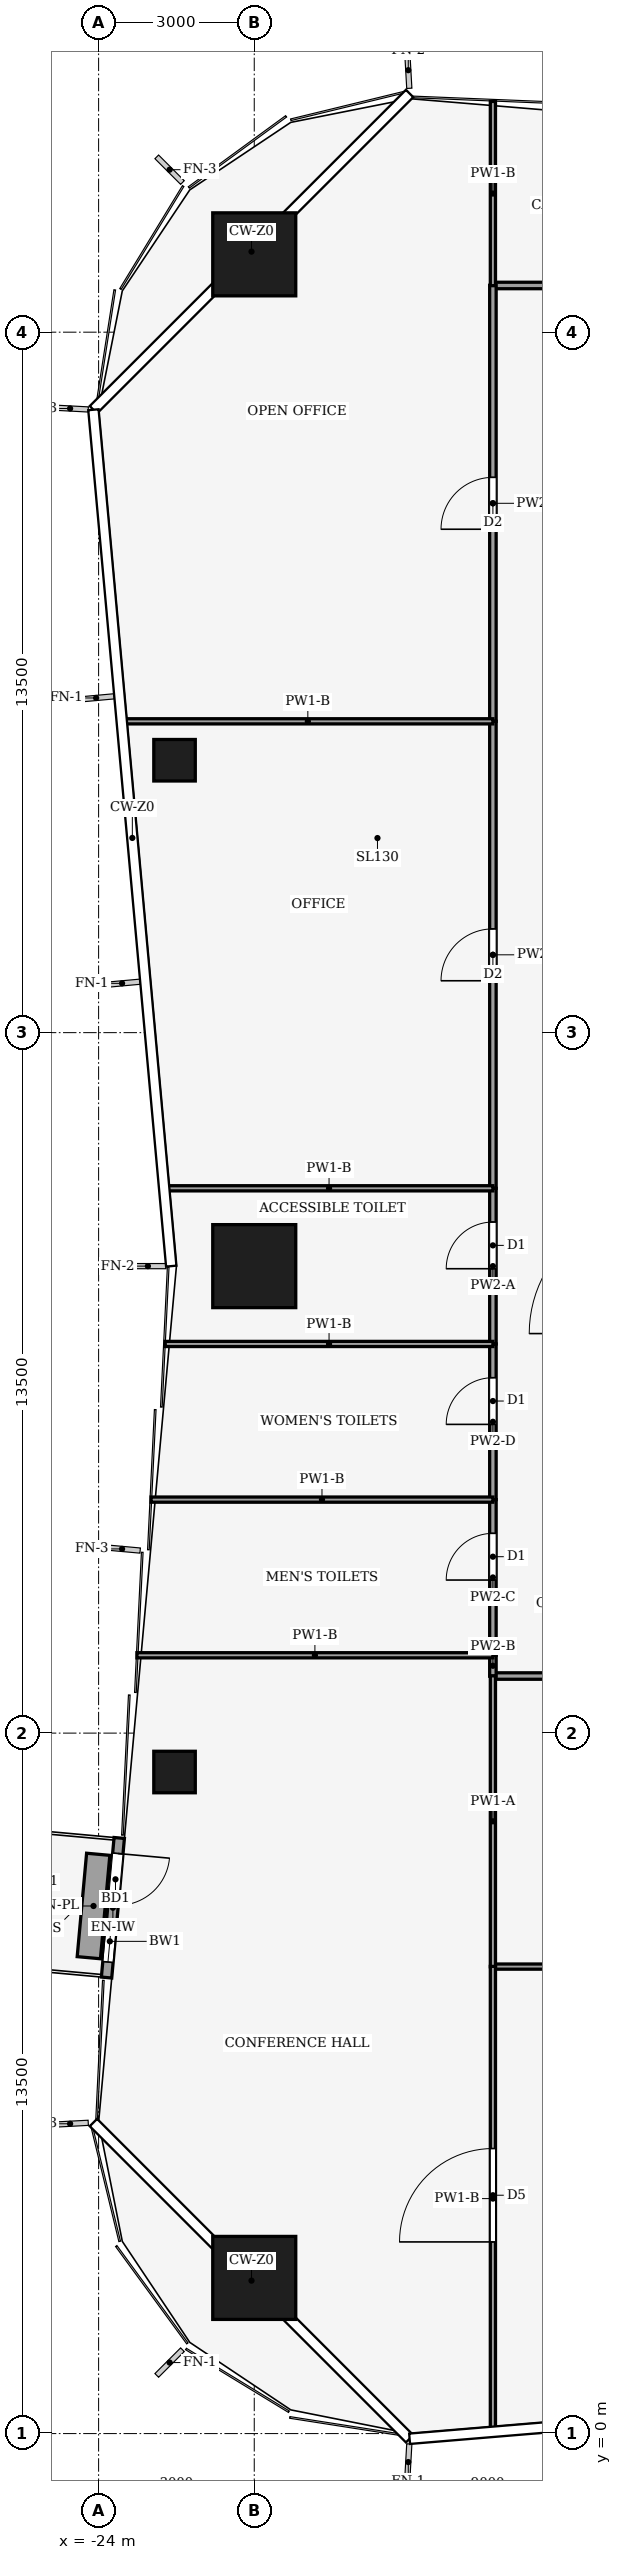
"""IFC4 building model, lengths in metres.
Left out: names, types, materials, properties, quantities, classifications, styles, units other than length and angle.
Written with IfcOpenShell. Run it as: python <this file> out.ifc"""

import sys

from ifc_helpers import new_model, si_unit, direction, frame, frame_2d, origin, origin_2d, place, context, subcontext, project, spatial, rectangle, hollow_rectangle, extrude, element, fill, save


model = new_model("IFC4")
c1 = context("Model", 3, precision=1e-05, world=origin(), true_north=direction((0.0, 1.0)))
c2 = subcontext(c1, "Body", "Model", "MODEL_VIEW")
j1 = project(units=[si_unit("LENGTHUNIT", "METRE"), si_unit("PLANEANGLEUNIT", "RADIAN")], contexts=[c1])
p1 = place(None, origin())
s1 = spatial("IfcSite", under=j1, at=p1, CompositionType="ELEMENT")
p2 = place(p1, origin())
s2 = spatial("IfcBuilding", under=s1, at=p2, CompositionType="ELEMENT")
p3 = place(p2, frame((0.0, 0.0, 9.0)))
s3 = spatial("IfcBuildingStorey", under=s2, at=p3, CompositionType="ELEMENT", Elevation=9.0)
for number, where, z_axis, x_axis in (
    (1, (-21.0, 42.0, 0.0), (0.0, 0.0, 1.0), (1.0, 0.0, 0.0)),
    (2, (-21.0, 3.0, 0.0), (0.0, 0.0, 1.0), (1.0, 0.0, 0.0)),
    (3, (-21.0, 22.5, 0.0), (0.0, 0.0, 1.0), (1.0, 0.0, 0.0)),
):
    element("IfcColumn", number, at=place(p3, frame(where, z_axis=z_axis, x_axis=x_axis)), inside=s3, PredefinedType="COLUMN", context=c2, shape_type="SweptSolid", body=[
        extrude(hollow_rectangle(XDim=1.6, YDim=1.6, WallThickness=0.09, at=origin_2d()), origin(), (0.0, 0.0, 1.0), 5.0),
    ])
for number, where, z_axis, x_axis in (
    (4, (-22.536, 12.75, 0.0), (0.0, 0.0, 1.0), (1.0, 0.0, 0.0)),
    (5, (-22.536, 32.25, 0.0), (0.0, 0.0, 1.0), (1.0, 0.0, 0.0)),
):
    element("IfcColumn", number, at=place(p3, frame(where, z_axis=z_axis, x_axis=x_axis)), inside=s3, PredefinedType="COLUMN", context=c2, shape_type="SweptSolid", body=[
        extrude(hollow_rectangle(XDim=0.8, YDim=0.8, WallThickness=0.04, at=origin_2d()), origin(), (0.0, 0.0, 1.0), 5.0),
    ])
p4 = place(p3, frame((-23.602, 11.479, 0.0), z_axis=(0.0, 0.0, 1.0), x_axis=(-0.090552042494, -0.995891724838, 0.0)))
e6 = element("IfcWall", 6, at=p4, inside=s3, PredefinedType="SOLIDWALL", context=c2, shape_type="SweptSolid", body=[
    extrude(rectangle(XDim=2.701, YDim=0.2, at=frame_2d((1.351, 0.0))), origin(), (0.0, 0.0, 1.0), 4.65),
])
p5 = place(p4, frame((0.3, 0.0, 0.0)))
e7 = element("IfcOpeningElement", 7, at=p5, cuts=e6, PredefinedType="OPENING", context=c2, shape_type="SweptSolid", body=[
    extrude(rectangle(XDim=1.0, YDim=2.1, at=frame_2d((0.5, 1.05))), frame((0.0, 0.11, 0.0), z_axis=(0.0, -1.0, 0.0), x_axis=(1.0, 0.0, 0.0)), (0.0, 0.0, 1.0), 0.22),
])
p6 = place(p4, frame((1.601, 0.0, 0.9)))
e8 = element("IfcOpeningElement", 8, at=p6, cuts=e6, PredefinedType="OPENING", context=c2, shape_type="SweptSolid", body=[
    extrude(rectangle(XDim=0.8, YDim=1.2, at=frame_2d((0.4, 0.6))), frame((0.0, 0.11, 0.0), z_axis=(0.0, -1.0, 0.0), x_axis=(1.0, 0.0, 0.0)), (0.0, 0.0, 1.0), 0.22),
])
p7 = place(p3, frame((-24.008, 11.165, 0.0), z_axis=(0.0, 0.0, 1.0), x_axis=(-0.090513748512, -0.995895205998, 0.0)))
e9 = element("IfcWall", 9, at=p7, inside=s3, PredefinedType="USERDEFINED", context=c2, shape_type="SweptSolid", body=[
    extrude(rectangle(XDim=2.001, YDim=0.45, at=frame_2d((1.001, 0.0))), origin(), (0.0, 0.0, 1.0), 0.4),
])
p8 = place(p3, frame((-12.0, 14.6, 0.0), z_axis=(0.0, 0.0, 1.0), x_axis=(-1.0, 0.0, 0.0)))
e10 = element("IfcWall", 10, at=p8, inside=s3, PredefinedType="PARTITIONING", context=c2, shape_type="SweptSolid", body=[
    extrude(rectangle(XDim=4.4, YDim=0.125, at=frame_2d((2.2, 0.0))), origin(), (0.0, 0.0, 1.0), 4.29),
])
p9 = place(p8, frame((1.7, 0.0, 0.0)))
e11 = element("IfcOpeningElement", 11, at=p9, cuts=e10, PredefinedType="OPENING", context=c2, shape_type="SweptSolid", body=[
    extrude(rectangle(XDim=1.0, YDim=2.1, at=frame_2d((0.5, 1.05))), frame((0.0, 0.073, 0.0), z_axis=(0.0, -1.0, 0.0), x_axis=(1.0, 0.0, 0.0)), (0.0, 0.0, 1.0), 0.145),
])
p10 = place(p3, frame((-16.4, 41.4, 0.0), z_axis=(0.0, 0.0, 1.0), x_axis=(1.0, 0.0, 0.0)))
e12 = element("IfcWall", 12, at=p10, inside=s3, PredefinedType="PARTITIONING", context=c2, shape_type="SweptSolid", body=[
    extrude(rectangle(XDim=10.4, YDim=0.125, at=frame_2d((5.2, 0.0))), origin(), (0.0, 0.0, 1.0), 4.54),
])
p11 = place(p10, frame((7.5, 0.0, 0.0)))
e13 = element("IfcOpeningElement", 13, at=p11, cuts=e12, PredefinedType="OPENING", context=c2, shape_type="SweptSolid", body=[
    extrude(rectangle(XDim=1.0, YDim=2.1, at=frame_2d((0.5, 1.05))), frame((0.0, 0.073, 0.0), z_axis=(0.0, -1.0, 0.0), x_axis=(1.0, 0.0, 0.0)), (0.0, 0.0, 1.0), 0.145),
])
p12 = place(p3, frame((-16.4, 15.0, 0.0), z_axis=(0.0, 0.0, 1.0), x_axis=(0.0, -1.0, 0.0)))
e14 = element("IfcWall", 14, at=p12, inside=s3, PredefinedType="PARTITIONING", context=c2, shape_type="SweptSolid", body=[
    extrude(rectangle(XDim=0.404, YDim=0.125, at=frame_2d((0.202, 0.0))), origin(), (0.0, 0.0, 1.0), 4.87),
])
p13 = place(p3, frame((-16.4, 15.0, 0.0), z_axis=(0.0, 0.0, 1.0), x_axis=(0.0, 1.0, 0.0)))
e15 = element("IfcWall", 15, at=p13, inside=s3, PredefinedType="PARTITIONING", context=c2, shape_type="SweptSolid", body=[
    extrude(rectangle(XDim=3.0, YDim=0.125, at=frame_2d((1.5, 0.0))), origin(), (0.0, 0.0, 1.0), 4.14),
])
p14 = place(p13, frame((1.45, 0.0, 0.0)))
e16 = element("IfcOpeningElement", 16, at=p14, cuts=e15, PredefinedType="OPENING", context=c2, shape_type="SweptSolid", body=[
    extrude(rectangle(XDim=0.9, YDim=2.1, at=frame_2d((0.45, 1.05))), frame((0.0, 0.073, 0.0), z_axis=(0.0, -1.0, 0.0), x_axis=(1.0, 0.0, 0.0)), (0.0, 0.0, 1.0), 0.145),
])
p15 = place(p3, frame((-16.4, 18.0, 0.0), z_axis=(0.0, 0.0, 1.0), x_axis=(0.0, 1.0, 0.0)))
e17 = element("IfcWall", 17, at=p15, inside=s3, PredefinedType="PARTITIONING", context=c2, shape_type="SweptSolid", body=[
    extrude(rectangle(XDim=3.0, YDim=0.125, at=frame_2d((1.5, 0.0))), origin(), (0.0, 0.0, 1.0), 4.48),
])
p16 = place(p15, frame((1.45, 0.0, 0.0)))
e18 = element("IfcOpeningElement", 18, at=p16, cuts=e17, PredefinedType="OPENING", context=c2, shape_type="SweptSolid", body=[
    extrude(rectangle(XDim=0.9, YDim=2.1, at=frame_2d((0.45, 1.05))), frame((0.0, 0.073, 0.0), z_axis=(0.0, -1.0, 0.0), x_axis=(1.0, 0.0, 0.0)), (0.0, 0.0, 1.0), 0.145),
])
p17 = place(p3, frame((-16.4, 21.0, 0.0), z_axis=(0.0, 0.0, 1.0), x_axis=(0.0, 1.0, 0.0)))
e19 = element("IfcWall", 19, at=p17, inside=s3, PredefinedType="PARTITIONING", context=c2, shape_type="SweptSolid", body=[
    extrude(rectangle(XDim=3.0, YDim=0.125, at=frame_2d((1.5, 0.0))), origin(), (0.0, 0.0, 1.0), 4.54),
])
p18 = place(p17, frame((1.45, 0.0, 0.0)))
e20 = element("IfcOpeningElement", 20, at=p18, cuts=e19, PredefinedType="OPENING", context=c2, shape_type="SweptSolid", body=[
    extrude(rectangle(XDim=0.9, YDim=2.1, at=frame_2d((0.45, 1.05))), frame((0.0, 0.073, 0.0), z_axis=(0.0, -1.0, 0.0), x_axis=(1.0, 0.0, 0.0)), (0.0, 0.0, 1.0), 0.145),
])
p19 = place(p3, frame((-16.4, 24.0, 0.0), z_axis=(0.0, 0.0, 1.0), x_axis=(0.0, 1.0, 0.0)))
e21 = element("IfcWall", 21, at=p19, inside=s3, PredefinedType="PARTITIONING", context=c2, shape_type="SweptSolid", body=[
    extrude(rectangle(XDim=9.0, YDim=0.125, at=frame_2d((4.5, 0.0))), origin(), (0.0, 0.0, 1.0), 4.48),
])
p20 = place(p19, frame((4.0, 0.0, 0.0)))
e22 = element("IfcOpeningElement", 22, at=p20, cuts=e21, PredefinedType="OPENING", context=c2, shape_type="SweptSolid", body=[
    extrude(rectangle(XDim=1.0, YDim=2.1, at=frame_2d((0.5, 1.05))), frame((0.0, 0.073, 0.0), z_axis=(0.0, -1.0, 0.0), x_axis=(1.0, 0.0, 0.0)), (0.0, 0.0, 1.0), 0.145),
])
p21 = place(p3, frame((-16.4, 33.0, 0.0), z_axis=(0.0, 0.0, 1.0), x_axis=(0.0, 1.0, 0.0)))
e23 = element("IfcWall", 23, at=p21, inside=s3, PredefinedType="PARTITIONING", context=c2, shape_type="SweptSolid", body=[
    extrude(rectangle(XDim=8.404, YDim=0.125, at=frame_2d((4.202, 0.0))), origin(), (0.0, 0.0, 1.0), 4.14),
])
p22 = place(p21, frame((3.702, 0.0, 0.0)))
e24 = element("IfcOpeningElement", 24, at=p22, cuts=e23, PredefinedType="OPENING", context=c2, shape_type="SweptSolid", body=[
    extrude(rectangle(XDim=1.0, YDim=2.1, at=frame_2d((0.5, 1.05))), frame((0.0, 0.073, 0.0), z_axis=(0.0, -1.0, 0.0), x_axis=(1.0, 0.0, 0.0)), (0.0, 0.0, 1.0), 0.145),
])
p23 = place(p3, frame((-16.4, 9.0, 0.0), z_axis=(0.0, 0.0, 1.0), x_axis=(1.0, 0.0, 0.0)))
e25 = element("IfcWall", 25, at=p23, inside=s3, PredefinedType="PARTITIONING", context=c2, shape_type="SweptSolid", body=[
    extrude(rectangle(XDim=4.404, YDim=0.1, at=frame_2d((2.202, 0.0))), origin(), (0.0, 0.0, 1.0), 4.29),
])
p24 = place(p3, frame((-16.4, 14.604, 0.0), z_axis=(0.0, 0.0, 1.0), x_axis=(0.0, -1.0, 0.0)))
e26 = element("IfcWall", 26, at=p24, inside=s3, PredefinedType="PARTITIONING", context=c2, shape_type="SweptSolid", body=[
    extrude(rectangle(XDim=5.608, YDim=0.1, at=frame_2d((2.804, 0.0))), origin(), (0.0, 0.0, 1.0), 4.87),
])
p25 = place(p3, frame((-16.4, 0.053, 0.0), z_axis=(0.0, 0.0, 1.0), x_axis=(0.0, 1.0, 0.0)))
e27 = element("IfcWall", 27, at=p25, inside=s3, PredefinedType="PARTITIONING", context=c2, shape_type="SweptSolid", body=[
    extrude(rectangle(XDim=8.951, YDim=0.1, at=frame_2d((4.475, 0.0))), origin(), (0.0, 0.0, 1.0), 4.04),
])
p26 = place(p25, frame((3.64, 0.0, 0.0)))
e28 = element("IfcOpeningElement", 28, at=p26, cuts=e27, PredefinedType="OPENING", context=c2, shape_type="SweptSolid", body=[
    extrude(rectangle(XDim=1.8, YDim=2.1, at=frame_2d((0.9, 1.05))), frame((0.0, 0.06, 0.0), z_axis=(0.0, -1.0, 0.0), x_axis=(1.0, 0.0, 0.0)), (0.0, 0.0, 1.0), 0.12),
])
p27 = place(p3, frame((-16.4, 44.947, 0.0), z_axis=(0.0, 0.0, 1.0), x_axis=(0.0, -1.0, 0.0)))
e29 = element("IfcWall", 29, at=p27, inside=s3, PredefinedType="PARTITIONING", context=c2, shape_type="SweptSolid", body=[
    extrude(rectangle(XDim=3.551, YDim=0.1, at=frame_2d((1.775, 0.0))), origin(), (0.0, 0.0, 1.0), 4.04),
])
p28 = place(p3, frame((-16.4, 15.0, 0.0), z_axis=(0.0, 0.0, 1.0), x_axis=(-1.0, 0.0, 0.0)))
e30 = element("IfcWall", 30, at=p28, inside=s3, PredefinedType="PARTITIONING", context=c2, shape_type="SweptSolid", body=[
    extrude(rectangle(XDim=6.862, YDim=0.1, at=frame_2d((3.431, 0.0))), origin(), (0.0, 0.0, 1.0), 4.04),
])
p29 = place(p3, frame((-16.4, 18.0, 0.0), z_axis=(0.0, 0.0, 1.0), x_axis=(-1.0, 0.0, 0.0)))
e31 = element("IfcWall", 31, at=p29, inside=s3, PredefinedType="PARTITIONING", context=c2, shape_type="SweptSolid", body=[
    extrude(rectangle(XDim=6.589, YDim=0.1, at=frame_2d((3.294, 0.0))), origin(), (0.0, 0.0, 1.0), 4.04),
])
for number, where, z_axis, x_axis in (
    (32, (-16.4, 21.0, 0.0), (0.0, 0.0, 1.0), (-1.0, 0.0, 0.0)),
    (33, (-16.4, 24.0, 0.0), (0.0, 0.0, 1.0), (-1.0, 0.0, 0.0)),
):
    element("IfcWall", number, at=place(p3, frame(where, z_axis=z_axis, x_axis=x_axis)), inside=s3, PredefinedType="PARTITIONING", context=c2, shape_type="SweptSolid", body=[
        extrude(rectangle(XDim=6.316, YDim=0.1, at=frame_2d((3.158, 0.0))), origin(), (0.0, 0.0, 1.0), 4.04),
    ])
p30 = place(p3, frame((-16.4, 33.0, 0.0), z_axis=(0.0, 0.0, 1.0), x_axis=(-1.0, 0.0, 0.0)))
e34 = element("IfcWall", 34, at=p30, inside=s3, PredefinedType="PARTITIONING", context=c2, shape_type="SweptSolid", body=[
    extrude(rectangle(XDim=7.135, YDim=0.1, at=frame_2d((3.567, 0.0))), origin(), (0.0, 0.0, 1.0), 4.04),
])
p31 = place(p5, origin())
e35 = element("IfcDoor", 35, at=p31, inside=s3, OperationType="SINGLE_SWING_LEFT", PredefinedType="DOOR", context=c2, shape_type="SweptSolid", body=[
    extrude(rectangle(XDim=1.0, YDim=2.1, at=frame_2d((0.5, 1.05))), frame((0.0, 0.025, 0.0), z_axis=(0.0, -1.0, 0.0), x_axis=(1.0, 0.0, 0.0)), (0.0, 0.0, 1.0), 0.05),
])
fill(e7, e35)
p32 = place(p6, origin())
e36 = element("IfcWindow", 36, at=p32, inside=s3, PartitioningType="SINGLE_PANEL", PredefinedType="WINDOW", context=c2, shape_type="SweptSolid", body=[
    extrude(rectangle(XDim=0.8, YDim=1.2, at=frame_2d((0.4, 0.6))), frame((0.0, 0.03, 0.0), z_axis=(0.0, -1.0, 0.0), x_axis=(1.0, 0.0, 0.0)), (0.0, 0.0, 1.0), 0.06),
])
fill(e8, e36)
p33 = place(p14, origin())
e37 = element("IfcDoor", 37, at=p33, inside=s3, OperationType="SINGLE_SWING_RIGHT", PredefinedType="DOOR", context=c2, shape_type="SweptSolid", body=[
    extrude(rectangle(XDim=0.9, YDim=2.1, at=frame_2d((0.45, 1.05))), frame((0.0, 0.025, 0.0), z_axis=(0.0, -1.0, 0.0), x_axis=(1.0, 0.0, 0.0)), (0.0, 0.0, 1.0), 0.05),
])
fill(e16, e37)
p34 = place(p16, origin())
e38 = element("IfcDoor", 38, at=p34, inside=s3, OperationType="SINGLE_SWING_RIGHT", PredefinedType="DOOR", context=c2, shape_type="SweptSolid", body=[
    extrude(rectangle(XDim=0.9, YDim=2.1, at=frame_2d((0.45, 1.05))), frame((0.0, 0.025, 0.0), z_axis=(0.0, -1.0, 0.0), x_axis=(1.0, 0.0, 0.0)), (0.0, 0.0, 1.0), 0.05),
])
fill(e18, e38)
p35 = place(p18, origin())
e39 = element("IfcDoor", 39, at=p35, inside=s3, OperationType="SINGLE_SWING_RIGHT", PredefinedType="DOOR", context=c2, shape_type="SweptSolid", body=[
    extrude(rectangle(XDim=0.9, YDim=2.1, at=frame_2d((0.45, 1.05))), frame((0.0, 0.025, 0.0), z_axis=(0.0, -1.0, 0.0), x_axis=(1.0, 0.0, 0.0)), (0.0, 0.0, 1.0), 0.05),
])
fill(e20, e39)
p36 = place(p20, origin())
e40 = element("IfcDoor", 40, at=p36, inside=s3, OperationType="SINGLE_SWING_RIGHT", PredefinedType="DOOR", context=c2, shape_type="SweptSolid", body=[
    extrude(rectangle(XDim=1.0, YDim=2.1, at=frame_2d((0.5, 1.05))), frame((0.0, 0.025, 0.0), z_axis=(0.0, -1.0, 0.0), x_axis=(1.0, 0.0, 0.0)), (0.0, 0.0, 1.0), 0.05),
])
fill(e22, e40)
p37 = place(p22, origin())
e41 = element("IfcDoor", 41, at=p37, inside=s3, OperationType="SINGLE_SWING_LEFT", PredefinedType="DOOR", context=c2, shape_type="SweptSolid", body=[
    extrude(rectangle(XDim=1.0, YDim=2.1, at=frame_2d((0.5, 1.05))), frame((0.0, 0.025, 0.0), z_axis=(0.0, -1.0, 0.0), x_axis=(1.0, 0.0, 0.0)), (0.0, 0.0, 1.0), 0.05),
])
fill(e24, e41)
p38 = place(p26, origin())
e42 = element("IfcDoor", 42, at=p38, inside=s3, OperationType="DOUBLE_DOOR_SINGLE_SWING", PredefinedType="DOOR", context=c2, shape_type="SweptSolid", body=[
    extrude(rectangle(XDim=1.8, YDim=2.1, at=frame_2d((0.9, 1.05))), frame((0.0, 0.025, 0.0), z_axis=(0.0, -1.0, 0.0), x_axis=(1.0, 0.0, 0.0)), (0.0, 0.0, 1.0), 0.05),
])
fill(e28, e42)
save(model, sys.argv[1])
